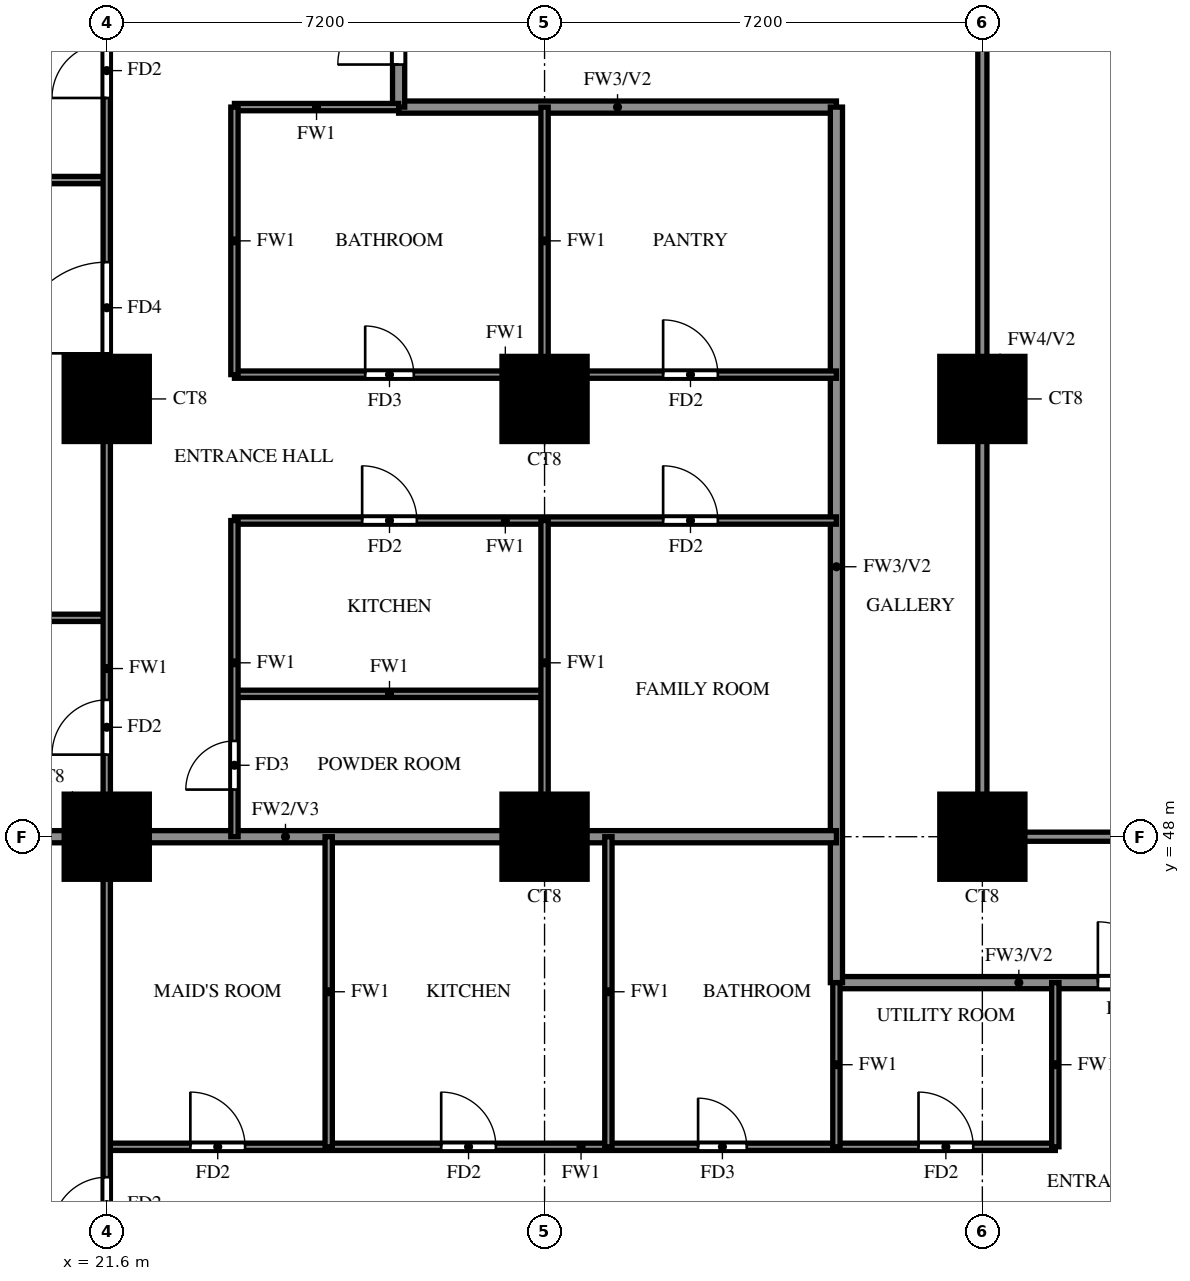
"""IFC4 building model, lengths in metres.
Left out: names, types, materials, properties, quantities, classifications, styles, units other than length and angle.
Written with IfcOpenShell. Run it as: python <this file> out.ifc"""

import sys

from ifc_helpers import new_model, si_unit, direction, frame, frame_2d, origin, origin_2d, place, context, subcontext, project, spatial, rectangle, extrude, source, transform, mapped, element, fill, save


model = new_model("IFC4")
c1 = context("Model", 3, precision=1e-05, world=origin(), true_north=direction((0.0, 1.0)))
c2 = subcontext(c1, "Body", "Model", "MODEL_VIEW")
j1 = project(units=[si_unit("LENGTHUNIT", "METRE"), si_unit("PLANEANGLEUNIT", "RADIAN")], contexts=[c1])
p1 = place(None, origin())
s1 = spatial("IfcSite", under=j1, at=p1, CompositionType="ELEMENT")
p2 = place(p1, origin())
s2 = spatial("IfcBuilding", under=s1, at=p2, CompositionType="ELEMENT")
p3 = place(p2, frame((0.0, 0.0, 34.0)))
s3 = spatial("IfcBuildingStorey", under=s2, at=p3, CompositionType="ELEMENT", Elevation=34.0)
m1 = source(origin(), c2, "Body", "SweptSolid", [
    extrude(rectangle(XDim=1.4, YDim=1.4, at=origin_2d()), origin(), (0.0, 0.0, 1.0), 3.18),
])
for number, where, z_axis, x_axis in (
    (1, (21.6, 48.0, 0.0), (0.0, 0.0, 1.0), (1.0, 0.0, 0.0)),
    (2, (28.8, 48.0, 0.0), (0.0, 0.0, 1.0), (1.0, 0.0, 0.0)),
    (3, (36.0, 48.0, 0.0), (0.0, 0.0, 1.0), (1.0, 0.0, 0.0)),
    (4, (21.6, 55.2, 0.0), (0.0, 0.0, 1.0), (1.0, 0.0, 0.0)),
    (5, (28.8, 55.2, 0.0), (0.0, 0.0, 1.0), (1.0, 0.0, 0.0)),
    (6, (36.0, 55.2, 0.0), (0.0, 0.0, 1.0), (1.0, 0.0, 0.0)),
):
    element("IfcColumn", number, at=place(p3, frame(where, z_axis=z_axis, x_axis=x_axis)), inside=s3, PredefinedType="COLUMN", context=c2, shape_type="MappedRepresentation", body=[
        mapped(m1, transform((0.0, 0.0, 0.0))),
    ])
p4 = place(p3, frame((33.6, 45.6, 0.0), z_axis=(0.0, 0.0, 1.0), x_axis=(1.0, 0.0, 0.0)))
e7 = element("IfcWall", 7, at=p4, inside=s3, PredefinedType="SOLIDWALL", context=c2, shape_type="SweptSolid", body=[
    extrude(rectangle(XDim=6.0, YDim=0.2, at=frame_2d((3.0, 0.0))), origin(), (0.0, 0.0, 1.0), 3.18),
])
p5 = place(p4, frame((4.3, 0.0, 0.0)))
e8 = element("IfcOpeningElement", 8, at=p5, cuts=e7, PredefinedType="OPENING", context=c2, shape_type="SweptSolid", body=[
    extrude(rectangle(XDim=1.0, YDim=2.1, at=frame_2d((0.5, 1.05))), frame((0.0, 0.11, 0.0), z_axis=(0.0, -1.0, 0.0), x_axis=(1.0, 0.0, 0.0)), (0.0, 0.0, 1.0), 0.22),
])
p6 = place(p3, frame((26.4, 60.0, 0.0), z_axis=(0.0, 0.0, 1.0), x_axis=(1.0, 0.0, 0.0)))
e9 = element("IfcWall", 9, at=p6, inside=s3, PredefinedType="SOLIDWALL", context=c2, shape_type="SweptSolid", body=[
    extrude(rectangle(XDim=7.2, YDim=0.2, at=frame_2d((3.6, 0.0))), origin(), (0.0, 0.0, 1.0), 3.18),
])
p7 = place(p3, frame((26.4, 60.0, 0.0), z_axis=(0.0, 0.0, 1.0), x_axis=(0.0, 1.0, 0.0)))
e10 = element("IfcWall", 10, at=p7, inside=s3, PredefinedType="SOLIDWALL", context=c2, shape_type="SweptSolid", body=[
    extrude(rectangle(XDim=9.6, YDim=0.2, at=frame_2d((4.8, 0.0))), origin(), (0.0, 0.0, 1.0), 3.18),
])
p8 = place(p7, frame((0.7, 0.0, 0.0)))
e11 = element("IfcOpeningElement", 11, at=p8, cuts=e10, PredefinedType="OPENING", context=c2, shape_type="SweptSolid", body=[
    extrude(rectangle(XDim=1.0, YDim=2.1, at=frame_2d((0.5, 1.05))), frame((0.0, 0.11, 0.0), z_axis=(0.0, -1.0, 0.0), x_axis=(1.0, 0.0, 0.0)), (0.0, 0.0, 1.0), 0.22),
])
p9 = place(p7, frame((3.1, 0.0, 0.0)))
e12 = element("IfcOpeningElement", 12, at=p9, cuts=e10, PredefinedType="OPENING", context=c2, shape_type="SweptSolid", body=[
    extrude(rectangle(XDim=1.0, YDim=2.1, at=frame_2d((0.5, 1.05))), frame((0.0, 0.11, 0.0), z_axis=(0.0, -1.0, 0.0), x_axis=(1.0, 0.0, 0.0)), (0.0, 0.0, 1.0), 0.22),
])
p10 = place(p3, frame((33.6, 45.6, 0.0), z_axis=(0.0, 0.0, 1.0), x_axis=(0.0, 1.0, 0.0)))
e13 = element("IfcWall", 13, at=p10, inside=s3, PredefinedType="SOLIDWALL", context=c2, shape_type="SweptSolid", body=[
    extrude(rectangle(XDim=14.4, YDim=0.2, at=frame_2d((7.2, 0.0))), origin(), (0.0, 0.0, 1.0), 3.18),
])
p11 = place(p3, frame((14.525, 48.0, 0.0), z_axis=(0.0, 0.0, 1.0), x_axis=(1.0, 0.0, 0.0)))
e14 = element("IfcWall", 14, at=p11, inside=s3, PredefinedType="SOLIDWALL", context=c2, shape_type="SweptSolid", body=[
    extrude(rectangle(XDim=19.075, YDim=0.2, at=frame_2d((9.538, 0.0))), origin(), (0.0, 0.0, 1.0), 3.18),
])
p12 = place(p3, frame((21.6, 42.9, 0.0), z_axis=(0.0, 0.0, 1.0), x_axis=(1.0, 0.0, 0.0)))
e15 = element("IfcWall", 15, at=p12, inside=s3, PredefinedType="PARTITIONING", context=c2, shape_type="SweptSolid", body=[
    extrude(rectangle(XDim=15.6, YDim=0.12, at=frame_2d((7.8, 0.0))), origin(), (0.0, 0.0, 1.0), 3.18),
])
p13 = place(p12, frame((1.375, 0.0, 0.0)))
e16 = element("IfcOpeningElement", 16, at=p13, cuts=e15, PredefinedType="OPENING", context=c2, shape_type="SweptSolid", body=[
    extrude(rectangle(XDim=0.9, YDim=2.1, at=frame_2d((0.45, 1.05))), frame((0.0, 0.07, 0.0), z_axis=(0.0, -1.0, 0.0), x_axis=(1.0, 0.0, 0.0)), (0.0, 0.0, 1.0), 0.14),
])
p14 = place(p12, frame((5.5, 0.0, 0.0)))
e17 = element("IfcOpeningElement", 17, at=p14, cuts=e15, PredefinedType="OPENING", context=c2, shape_type="SweptSolid", body=[
    extrude(rectangle(XDim=0.9, YDim=2.1, at=frame_2d((0.45, 1.05))), frame((0.0, 0.07, 0.0), z_axis=(0.0, -1.0, 0.0), x_axis=(1.0, 0.0, 0.0)), (0.0, 0.0, 1.0), 0.14),
])
p15 = place(p12, frame((9.725, 0.0, 0.0)))
e18 = element("IfcOpeningElement", 18, at=p15, cuts=e15, PredefinedType="OPENING", context=c2, shape_type="SweptSolid", body=[
    extrude(rectangle(XDim=0.8, YDim=2.1, at=frame_2d((0.4, 1.05))), frame((0.0, 0.07, 0.0), z_axis=(0.0, -1.0, 0.0), x_axis=(1.0, 0.0, 0.0)), (0.0, 0.0, 1.0), 0.14),
])
p16 = place(p12, frame((13.35, 0.0, 0.0)))
e19 = element("IfcOpeningElement", 19, at=p16, cuts=e15, PredefinedType="OPENING", context=c2, shape_type="SweptSolid", body=[
    extrude(rectangle(XDim=0.9, YDim=2.1, at=frame_2d((0.45, 1.05))), frame((0.0, 0.07, 0.0), z_axis=(0.0, -1.0, 0.0), x_axis=(1.0, 0.0, 0.0)), (0.0, 0.0, 1.0), 0.14),
])
p17 = place(p3, frame((23.7, 50.35, 0.0), z_axis=(0.0, 0.0, 1.0), x_axis=(1.0, 0.0, 0.0)))
e20 = element("IfcWall", 20, at=p17, inside=s3, PredefinedType="PARTITIONING", context=c2, shape_type="SweptSolid", body=[
    extrude(rectangle(XDim=5.1, YDim=0.12, at=frame_2d((2.55, 0.0))), origin(), (0.0, 0.0, 1.0), 3.18),
])
p18 = place(p3, frame((14.525, 51.6, 0.0), z_axis=(0.0, 0.0, 1.0), x_axis=(1.0, 0.0, 0.0)))
e21 = element("IfcWall", 21, at=p18, inside=s3, PredefinedType="PARTITIONING", context=c2, shape_type="SweptSolid", body=[
    extrude(rectangle(XDim=7.075, YDim=0.12, at=frame_2d((3.538, 0.0))), origin(), (0.0, 0.0, 1.0), 2.28),
])
p19 = place(p3, frame((23.7, 53.2, 0.0), z_axis=(0.0, 0.0, 1.0), x_axis=(1.0, 0.0, 0.0)))
e22 = element("IfcWall", 22, at=p19, inside=s3, PredefinedType="PARTITIONING", context=c2, shape_type="SweptSolid", body=[
    extrude(rectangle(XDim=9.9, YDim=0.12, at=frame_2d((4.95, 0.0))), origin(), (0.0, 0.0, 1.0), 3.18),
])
p20 = place(p19, frame((2.1, 0.0, 0.0)))
e23 = element("IfcOpeningElement", 23, at=p20, cuts=e22, PredefinedType="OPENING", context=c2, shape_type="SweptSolid", body=[
    extrude(rectangle(XDim=0.9, YDim=2.1, at=frame_2d((0.45, 1.05))), frame((0.0, 0.07, 0.0), z_axis=(0.0, -1.0, 0.0), x_axis=(1.0, 0.0, 0.0)), (0.0, 0.0, 1.0), 0.14),
])
p21 = place(p19, frame((7.05, 0.0, 0.0)))
e24 = element("IfcOpeningElement", 24, at=p21, cuts=e22, PredefinedType="OPENING", context=c2, shape_type="SweptSolid", body=[
    extrude(rectangle(XDim=0.9, YDim=2.1, at=frame_2d((0.45, 1.05))), frame((0.0, 0.07, 0.0), z_axis=(0.0, -1.0, 0.0), x_axis=(1.0, 0.0, 0.0)), (0.0, 0.0, 1.0), 0.14),
])
p22 = place(p3, frame((23.7, 55.6, 0.0), z_axis=(0.0, 0.0, 1.0), x_axis=(1.0, 0.0, 0.0)))
e25 = element("IfcWall", 25, at=p22, inside=s3, PredefinedType="PARTITIONING", context=c2, shape_type="SweptSolid", body=[
    extrude(rectangle(XDim=9.9, YDim=0.12, at=frame_2d((4.95, 0.0))), origin(), (0.0, 0.0, 1.0), 3.18),
])
p23 = place(p22, frame((2.15, 0.0, 0.0)))
e26 = element("IfcOpeningElement", 26, at=p23, cuts=e25, PredefinedType="OPENING", context=c2, shape_type="SweptSolid", body=[
    extrude(rectangle(XDim=0.8, YDim=2.1, at=frame_2d((0.4, 1.05))), frame((0.0, 0.07, 0.0), z_axis=(0.0, -1.0, 0.0), x_axis=(1.0, 0.0, 0.0)), (0.0, 0.0, 1.0), 0.14),
])
p24 = place(p22, frame((7.05, 0.0, 0.0)))
e27 = element("IfcOpeningElement", 27, at=p24, cuts=e25, PredefinedType="OPENING", context=c2, shape_type="SweptSolid", body=[
    extrude(rectangle(XDim=0.9, YDim=2.1, at=frame_2d((0.45, 1.05))), frame((0.0, 0.07, 0.0), z_axis=(0.0, -1.0, 0.0), x_axis=(1.0, 0.0, 0.0)), (0.0, 0.0, 1.0), 0.14),
])
p25 = place(p3, frame((14.525, 58.8, 0.0), z_axis=(0.0, 0.0, 1.0), x_axis=(1.0, 0.0, 0.0)))
e28 = element("IfcWall", 28, at=p25, inside=s3, PredefinedType="PARTITIONING", context=c2, shape_type="SweptSolid", body=[
    extrude(rectangle(XDim=7.075, YDim=0.12, at=frame_2d((3.538, 0.0))), origin(), (0.0, 0.0, 1.0), 2.28),
])
p26 = place(p3, frame((23.7, 60.0, 0.0), z_axis=(0.0, 0.0, 1.0), x_axis=(1.0, 0.0, 0.0)))
e29 = element("IfcWall", 29, at=p26, inside=s3, PredefinedType="PARTITIONING", context=c2, shape_type="SweptSolid", body=[
    extrude(rectangle(XDim=2.7, YDim=0.12, at=frame_2d((1.35, 0.0))), origin(), (0.0, 0.0, 1.0), 3.18),
])
p27 = place(p3, frame((21.6, 33.725, 0.0), z_axis=(0.0, 0.0, 1.0), x_axis=(0.0, 1.0, 0.0)))
e30 = element("IfcWall", 30, at=p27, inside=s3, PredefinedType="PARTITIONING", context=c2, shape_type="SweptSolid", body=[
    extrude(rectangle(XDim=35.875, YDim=0.12, at=frame_2d((17.938, 0.0))), origin(), (0.0, 0.0, 1.0), 3.18),
])
p28 = place(p27, frame((7.775, 0.0, 0.0)))
e31 = element("IfcOpeningElement", 31, at=p28, cuts=e30, PredefinedType="OPENING", context=c2, shape_type="SweptSolid", body=[
    extrude(rectangle(XDim=0.9, YDim=2.1, at=frame_2d((0.45, 1.05))), frame((0.0, 0.07, 0.0), z_axis=(0.0, -1.0, 0.0), x_axis=(1.0, 0.0, 0.0)), (0.0, 0.0, 1.0), 0.14),
])
p29 = place(p27, frame((15.625, 0.0, 0.0)))
e32 = element("IfcOpeningElement", 32, at=p29, cuts=e30, PredefinedType="OPENING", context=c2, shape_type="SweptSolid", body=[
    extrude(rectangle(XDim=0.9, YDim=2.1, at=frame_2d((0.45, 1.05))), frame((0.0, 0.07, 0.0), z_axis=(0.0, -1.0, 0.0), x_axis=(1.0, 0.0, 0.0)), (0.0, 0.0, 1.0), 0.14),
])
p30 = place(p27, frame((22.225, 0.0, 0.0)))
e33 = element("IfcOpeningElement", 33, at=p30, cuts=e30, PredefinedType="OPENING", context=c2, shape_type="SweptSolid", body=[
    extrude(rectangle(XDim=1.5, YDim=2.1, at=frame_2d((0.75, 1.05))), frame((0.0, 0.07, 0.0), z_axis=(0.0, -1.0, 0.0), x_axis=(1.0, 0.0, 0.0)), (0.0, 0.0, 1.0), 0.14),
])
p31 = place(p27, frame((26.425, 0.0, 0.0)))
e34 = element("IfcOpeningElement", 34, at=p31, cuts=e30, PredefinedType="OPENING", context=c2, shape_type="SweptSolid", body=[
    extrude(rectangle(XDim=0.9, YDim=2.1, at=frame_2d((0.45, 1.05))), frame((0.0, 0.07, 0.0), z_axis=(0.0, -1.0, 0.0), x_axis=(1.0, 0.0, 0.0)), (0.0, 0.0, 1.0), 0.14),
])
p32 = place(p27, frame((30.025, 0.0, 0.0)))
e35 = element("IfcOpeningElement", 35, at=p32, cuts=e30, PredefinedType="OPENING", context=c2, shape_type="SweptSolid", body=[
    extrude(rectangle(XDim=0.9, YDim=2.1, at=frame_2d((0.45, 1.05))), frame((0.0, 0.07, 0.0), z_axis=(0.0, -1.0, 0.0), x_axis=(1.0, 0.0, 0.0)), (0.0, 0.0, 1.0), 0.14),
])
p33 = place(p27, frame((33.625, 0.0, 0.0)))
e36 = element("IfcOpeningElement", 36, at=p33, cuts=e30, PredefinedType="OPENING", context=c2, shape_type="SweptSolid", body=[
    extrude(rectangle(XDim=0.9, YDim=2.1, at=frame_2d((0.45, 1.05))), frame((0.0, 0.07, 0.0), z_axis=(0.0, -1.0, 0.0), x_axis=(1.0, 0.0, 0.0)), (0.0, 0.0, 1.0), 0.14),
])
p34 = place(p3, frame((23.7, 48.0, 0.0), z_axis=(0.0, 0.0, 1.0), x_axis=(0.0, 1.0, 0.0)))
e37 = element("IfcWall", 37, at=p34, inside=s3, PredefinedType="PARTITIONING", context=c2, shape_type="SweptSolid", body=[
    extrude(rectangle(XDim=5.2, YDim=0.12, at=frame_2d((2.6, 0.0))), origin(), (0.0, 0.0, 1.0), 3.18),
])
p35 = place(p34, frame((0.775, 0.0, 0.0)))
e38 = element("IfcOpeningElement", 38, at=p35, cuts=e37, PredefinedType="OPENING", context=c2, shape_type="SweptSolid", body=[
    extrude(rectangle(XDim=0.8, YDim=2.1, at=frame_2d((0.4, 1.05))), frame((0.0, 0.07, 0.0), z_axis=(0.0, -1.0, 0.0), x_axis=(1.0, 0.0, 0.0)), (0.0, 0.0, 1.0), 0.14),
])
p36 = place(p3, frame((23.7, 55.6, 0.0), z_axis=(0.0, 0.0, 1.0), x_axis=(0.0, 1.0, 0.0)))
e39 = element("IfcWall", 39, at=p36, inside=s3, PredefinedType="PARTITIONING", context=c2, shape_type="SweptSolid", body=[
    extrude(rectangle(XDim=4.4, YDim=0.12, at=frame_2d((2.2, 0.0))), origin(), (0.0, 0.0, 1.0), 3.18),
])
p37 = place(p3, frame((25.25, 42.9, 0.0), z_axis=(0.0, 0.0, 1.0), x_axis=(0.0, 1.0, 0.0)))
e40 = element("IfcWall", 40, at=p37, inside=s3, PredefinedType="PARTITIONING", context=c2, shape_type="SweptSolid", body=[
    extrude(rectangle(XDim=5.1, YDim=0.12, at=frame_2d((2.55, 0.0))), origin(), (0.0, 0.0, 1.0), 3.18),
])
p38 = place(p3, frame((28.8, 48.0, 0.0), z_axis=(0.0, 0.0, 1.0), x_axis=(0.0, 1.0, 0.0)))
e41 = element("IfcWall", 41, at=p38, inside=s3, PredefinedType="PARTITIONING", context=c2, shape_type="SweptSolid", body=[
    extrude(rectangle(XDim=5.2, YDim=0.12, at=frame_2d((2.6, 0.0))), origin(), (0.0, 0.0, 1.0), 3.18),
])
p39 = place(p3, frame((28.8, 55.6, 0.0), z_axis=(0.0, 0.0, 1.0), x_axis=(0.0, 1.0, 0.0)))
e42 = element("IfcWall", 42, at=p39, inside=s3, PredefinedType="PARTITIONING", context=c2, shape_type="SweptSolid", body=[
    extrude(rectangle(XDim=4.4, YDim=0.12, at=frame_2d((2.2, 0.0))), origin(), (0.0, 0.0, 1.0), 3.18),
])
p40 = place(p3, frame((29.85, 42.9, 0.0), z_axis=(0.0, 0.0, 1.0), x_axis=(0.0, 1.0, 0.0)))
e43 = element("IfcWall", 43, at=p40, inside=s3, PredefinedType="PARTITIONING", context=c2, shape_type="SweptSolid", body=[
    extrude(rectangle(XDim=5.1, YDim=0.12, at=frame_2d((2.55, 0.0))), origin(), (0.0, 0.0, 1.0), 3.18),
])
for number, where, z_axis, x_axis in (
    (44, (33.6, 42.9, 0.0), (0.0, 0.0, 1.0), (0.0, 1.0, 0.0)),
    (45, (37.2, 42.9, 0.0), (0.0, 0.0, 1.0), (0.0, 1.0, 0.0)),
):
    element("IfcWall", number, at=place(p3, frame(where, z_axis=z_axis, x_axis=x_axis)), inside=s3, PredefinedType="PARTITIONING", context=c2, shape_type="SweptSolid", body=[
        extrude(rectangle(XDim=2.7, YDim=0.12, at=frame_2d((1.35, 0.0))), origin(), (0.0, 0.0, 1.0), 3.18),
    ])
p41 = place(p3, frame((36.0, 48.0, 0.0), z_axis=(0.0, 0.0, 1.0), x_axis=(1.0, 0.0, 0.0)))
e46 = element("IfcWall", 46, at=p41, inside=s3, PredefinedType="SOLIDWALL", context=c2, shape_type="SweptSolid", body=[
    extrude(rectangle(XDim=7.2, YDim=0.15, at=frame_2d((3.6, 0.0))), origin(), (0.0, 0.0, 1.0), 2.28),
])
p42 = place(p3, frame((36.0, 48.0, 0.0), z_axis=(0.0, 0.0, 1.0), x_axis=(0.0, 1.0, 0.0)))
e47 = element("IfcWall", 47, at=p42, inside=s3, PredefinedType="SOLIDWALL", context=c2, shape_type="SweptSolid", body=[
    extrude(rectangle(XDim=14.4, YDim=0.15, at=frame_2d((7.2, 0.0))), origin(), (0.0, 0.0, 1.0), 2.28),
])
p43 = place(p5, origin())
e48 = element("IfcDoor", 48, at=p43, inside=s3, OperationType="SINGLE_SWING_LEFT", PredefinedType="DOOR", context=c2, shape_type="SweptSolid", body=[
    extrude(rectangle(XDim=1.0, YDim=2.1, at=frame_2d((0.5, 1.05))), frame((0.0, 0.025, 0.0), z_axis=(0.0, -1.0, 0.0), x_axis=(1.0, 0.0, 0.0)), (0.0, 0.0, 1.0), 0.05),
])
fill(e8, e48)
p44 = place(p28, origin())
e49 = element("IfcDoor", 49, at=p44, inside=s3, OperationType="SINGLE_SWING_RIGHT", PredefinedType="DOOR", context=c2, shape_type="SweptSolid", body=[
    extrude(rectangle(XDim=0.9, YDim=2.1, at=frame_2d((0.45, 1.05))), frame((0.0, 0.025, 0.0), z_axis=(0.0, -1.0, 0.0), x_axis=(1.0, 0.0, 0.0)), (0.0, 0.0, 1.0), 0.05),
])
fill(e31, e49)
p45 = place(p13, origin())
e50 = element("IfcDoor", 50, at=p45, inside=s3, OperationType="SINGLE_SWING_LEFT", PredefinedType="DOOR", context=c2, shape_type="SweptSolid", body=[
    extrude(rectangle(XDim=0.9, YDim=2.1, at=frame_2d((0.45, 1.05))), frame((0.0, 0.025, 0.0), z_axis=(0.0, -1.0, 0.0), x_axis=(1.0, 0.0, 0.0)), (0.0, 0.0, 1.0), 0.05),
])
fill(e16, e50)
p46 = place(p14, origin())
e51 = element("IfcDoor", 51, at=p46, inside=s3, OperationType="SINGLE_SWING_RIGHT", PredefinedType="DOOR", context=c2, shape_type="SweptSolid", body=[
    extrude(rectangle(XDim=0.9, YDim=2.1, at=frame_2d((0.45, 1.05))), frame((0.0, 0.025, 0.0), z_axis=(0.0, -1.0, 0.0), x_axis=(1.0, 0.0, 0.0)), (0.0, 0.0, 1.0), 0.05),
])
fill(e17, e51)
p47 = place(p15, origin())
e52 = element("IfcDoor", 52, at=p47, inside=s3, OperationType="SINGLE_SWING_LEFT", PredefinedType="DOOR", context=c2, shape_type="SweptSolid", body=[
    extrude(rectangle(XDim=0.8, YDim=2.1, at=frame_2d((0.4, 1.05))), frame((0.0, 0.025, 0.0), z_axis=(0.0, -1.0, 0.0), x_axis=(1.0, 0.0, 0.0)), (0.0, 0.0, 1.0), 0.05),
])
fill(e18, e52)
p48 = place(p16, origin())
e53 = element("IfcDoor", 53, at=p48, inside=s3, OperationType="SINGLE_SWING_LEFT", PredefinedType="DOOR", context=c2, shape_type="SweptSolid", body=[
    extrude(rectangle(XDim=0.9, YDim=2.1, at=frame_2d((0.45, 1.05))), frame((0.0, 0.025, 0.0), z_axis=(0.0, -1.0, 0.0), x_axis=(1.0, 0.0, 0.0)), (0.0, 0.0, 1.0), 0.05),
])
fill(e19, e53)
p49 = place(p8, origin())
e54 = element("IfcDoor", 54, at=p49, inside=s3, OperationType="SINGLE_SWING_RIGHT", PredefinedType="DOOR", context=c2, shape_type="SweptSolid", body=[
    extrude(rectangle(XDim=1.0, YDim=2.1, at=frame_2d((0.5, 1.05))), frame((0.0, 0.025, 0.0), z_axis=(0.0, -1.0, 0.0), x_axis=(1.0, 0.0, 0.0)), (0.0, 0.0, 1.0), 0.05),
])
fill(e11, e54)
p50 = place(p29, origin())
e55 = element("IfcDoor", 55, at=p50, inside=s3, OperationType="SINGLE_SWING_LEFT", PredefinedType="DOOR", context=c2, shape_type="SweptSolid", body=[
    extrude(rectangle(XDim=0.9, YDim=2.1, at=frame_2d((0.45, 1.05))), frame((0.0, 0.025, 0.0), z_axis=(0.0, -1.0, 0.0), x_axis=(1.0, 0.0, 0.0)), (0.0, 0.0, 1.0), 0.05),
])
fill(e32, e55)
p51 = place(p30, origin())
e56 = element("IfcDoor", 56, at=p51, inside=s3, OperationType="SINGLE_SWING_RIGHT", PredefinedType="DOOR", context=c2, shape_type="SweptSolid", body=[
    extrude(rectangle(XDim=1.5, YDim=2.1, at=frame_2d((0.75, 1.05))), frame((0.0, 0.025, 0.0), z_axis=(0.0, -1.0, 0.0), x_axis=(1.0, 0.0, 0.0)), (0.0, 0.0, 1.0), 0.05),
])
fill(e33, e56)
p52 = place(p31, origin())
e57 = element("IfcDoor", 57, at=p52, inside=s3, OperationType="SINGLE_SWING_RIGHT", PredefinedType="DOOR", context=c2, shape_type="SweptSolid", body=[
    extrude(rectangle(XDim=0.9, YDim=2.1, at=frame_2d((0.45, 1.05))), frame((0.0, 0.025, 0.0), z_axis=(0.0, -1.0, 0.0), x_axis=(1.0, 0.0, 0.0)), (0.0, 0.0, 1.0), 0.05),
])
fill(e34, e57)
p53 = place(p35, origin())
e58 = element("IfcDoor", 58, at=p53, inside=s3, OperationType="SINGLE_SWING_LEFT", PredefinedType="DOOR", context=c2, shape_type="SweptSolid", body=[
    extrude(rectangle(XDim=0.8, YDim=2.1, at=frame_2d((0.4, 1.05))), frame((0.0, 0.025, 0.0), z_axis=(0.0, -1.0, 0.0), x_axis=(1.0, 0.0, 0.0)), (0.0, 0.0, 1.0), 0.05),
])
fill(e38, e58)
p54 = place(p20, origin())
e59 = element("IfcDoor", 59, at=p54, inside=s3, OperationType="SINGLE_SWING_LEFT", PredefinedType="DOOR", context=c2, shape_type="SweptSolid", body=[
    extrude(rectangle(XDim=0.9, YDim=2.1, at=frame_2d((0.45, 1.05))), frame((0.0, 0.025, 0.0), z_axis=(0.0, -1.0, 0.0), x_axis=(1.0, 0.0, 0.0)), (0.0, 0.0, 1.0), 0.05),
])
fill(e23, e59)
p55 = place(p23, origin())
e60 = element("IfcDoor", 60, at=p55, inside=s3, OperationType="SINGLE_SWING_RIGHT", PredefinedType="DOOR", context=c2, shape_type="SweptSolid", body=[
    extrude(rectangle(XDim=0.8, YDim=2.1, at=frame_2d((0.4, 1.05))), frame((0.0, 0.025, 0.0), z_axis=(0.0, -1.0, 0.0), x_axis=(1.0, 0.0, 0.0)), (0.0, 0.0, 1.0), 0.05),
])
fill(e26, e60)
p56 = place(p21, origin())
e61 = element("IfcDoor", 61, at=p56, inside=s3, OperationType="SINGLE_SWING_LEFT", PredefinedType="DOOR", context=c2, shape_type="SweptSolid", body=[
    extrude(rectangle(XDim=0.9, YDim=2.1, at=frame_2d((0.45, 1.05))), frame((0.0, 0.025, 0.0), z_axis=(0.0, -1.0, 0.0), x_axis=(1.0, 0.0, 0.0)), (0.0, 0.0, 1.0), 0.05),
])
fill(e24, e61)
p57 = place(p24, origin())
e62 = element("IfcDoor", 62, at=p57, inside=s3, OperationType="SINGLE_SWING_LEFT", PredefinedType="DOOR", context=c2, shape_type="SweptSolid", body=[
    extrude(rectangle(XDim=0.9, YDim=2.1, at=frame_2d((0.45, 1.05))), frame((0.0, 0.025, 0.0), z_axis=(0.0, -1.0, 0.0), x_axis=(1.0, 0.0, 0.0)), (0.0, 0.0, 1.0), 0.05),
])
fill(e27, e62)
save(model, sys.argv[1])
